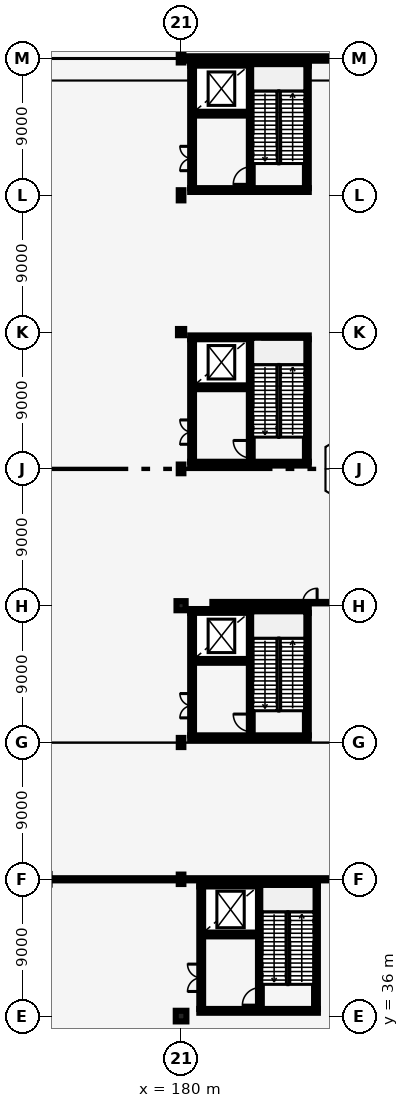
"""IFC4 building model, lengths in metres.
Left out: names, types, materials, properties, quantities, classifications, styles, units other than length and angle.
Written with IfcOpenShell. Run it as: python <this file> out.ifc"""

import sys

from ifc_helpers import new_model, si_unit, direction, frame, frame_2d, origin, origin_2d, place, context, subcontext, project, spatial, rectangle, hollow_circle, i_section, extrude, element, fill, save


model = new_model("IFC4")
c1 = context("Model", 3, precision=1e-05, world=origin(), true_north=direction((0.0, 1.0)))
c2 = subcontext(c1, "Body", "Model", "MODEL_VIEW")
j1 = project(units=[si_unit("LENGTHUNIT", "METRE"), si_unit("PLANEANGLEUNIT", "RADIAN")], contexts=[c1])
p1 = place(None, origin())
s1 = spatial("IfcSite", under=j1, at=p1, CompositionType="ELEMENT")
p2 = place(p1, origin())
s2 = spatial("IfcBuilding", under=s1, at=p2, CompositionType="ELEMENT")
p3 = place(p2, frame((0.0, 0.0, 12.0)))
s3 = spatial("IfcBuildingStorey", under=s2, at=p3, CompositionType="ELEMENT", Elevation=12.0)
p4 = place(p3, frame((180.0, 36.0, 0.0), z_axis=(0.0, 0.0, 1.0), x_axis=(1.0, 0.0, 0.0)))
e1 = element("IfcColumn", 1, at=p4, inside=s3, PredefinedType="COLUMN", context=c2, shape_type="SweptSolid", body=[
    extrude(rectangle(XDim=0.7, YDim=0.7, at=origin_2d()), origin(), (0.0, 0.0, 1.0), 6.0),
])
p5 = place(p3, frame((180.0, 45.0, 0.0), z_axis=(0.0, 0.0, 1.0), x_axis=(1.0, 0.0, 0.0)))
e2 = element("IfcColumn", 2, at=p5, inside=s3, PredefinedType="COLUMN", context=c2, shape_type="SweptSolid", body=[
    extrude(i_section(OverallWidth=0.305, OverallDepth=0.62, WebThickness=0.021, FlangeThickness=0.04, FilletRadius=0.027, at=origin_2d()), origin(), (0.0, 0.0, 1.0), 6.0),
])
p6 = place(p3, frame((180.0, 54.0, 0.0), z_axis=(0.0, 0.0, 1.0), x_axis=(1.0, 0.0, 0.0)))
e3 = element("IfcColumn", 3, at=p6, inside=s3, PredefinedType="COLUMN", context=c2, shape_type="SweptSolid", body=[
    extrude(i_section(OverallWidth=0.3, OverallDepth=0.6, WebThickness=0.015, FlangeThickness=0.03, FilletRadius=0.027, at=origin_2d()), origin(), (0.0, 0.0, 1.0), 6.0),
])
p7 = place(p3, frame((180.0, 63.0, 0.0), z_axis=(0.0, 0.0, 1.0), x_axis=(1.0, 0.0, 0.0)))
e4 = element("IfcColumn", 4, at=p7, inside=s3, PredefinedType="COLUMN", context=c2, shape_type="SweptSolid", body=[
    extrude(rectangle(XDim=0.6, YDim=0.6, at=origin_2d()), origin(), (0.0, 0.0, 1.0), 6.0),
])
p8 = place(p3, frame((180.0, 72.0, 0.0), z_axis=(0.0, 0.0, 1.0), x_axis=(1.0, 0.0, 0.0)))
e5 = element("IfcColumn", 5, at=p8, inside=s3, PredefinedType="COLUMN", context=c2, shape_type="SweptSolid", body=[
    extrude(i_section(OverallWidth=0.306, OverallDepth=0.572, WebThickness=0.021, FlangeThickness=0.04, FilletRadius=0.027, at=origin_2d()), origin(), (0.0, 0.0, 1.0), 6.0),
])
p9 = place(p3, frame((180.0, 81.0, 0.0), z_axis=(0.0, 0.0, 1.0), x_axis=(1.0, 0.0, 0.0)))
e6 = element("IfcColumn", 6, at=p9, inside=s3, PredefinedType="COLUMN", context=c2, shape_type="SweptSolid", body=[
    extrude(hollow_circle(Radius=0.203, WallThickness=0.016, at=origin_2d()), origin(), (0.0, 0.0, 1.0), 6.0),
])
p10 = place(p3, frame((180.0, 90.0, 0.0), z_axis=(0.0, 0.0, 1.0), x_axis=(1.0, 0.0, 0.0)))
e7 = element("IfcColumn", 7, at=p10, inside=s3, PredefinedType="COLUMN", context=c2, shape_type="SweptSolid", body=[
    extrude(i_section(OverallWidth=0.305, OverallDepth=0.668, WebThickness=0.021, FlangeThickness=0.04, FilletRadius=0.027, at=origin_2d()), origin(), (0.0, 0.0, 1.0), 6.0),
])
p11 = place(p3, frame((180.0, 99.0, 0.0), z_axis=(0.0, 0.0, 1.0), x_axis=(1.0, 0.0, 0.0)))
e8 = element("IfcColumn", 8, at=p11, inside=s3, PredefinedType="COLUMN", context=c2, shape_type="SweptSolid", body=[
    extrude(i_section(OverallWidth=0.306, OverallDepth=0.524, WebThickness=0.021, FlangeThickness=0.04, FilletRadius=0.027, at=origin_2d()), origin(), (0.0, 0.0, 1.0), 6.0),
])
p12 = place(p3, frame((180.148, 99.0, 0.0), z_axis=(0.0, 0.0, 1.0), x_axis=(1.0, 0.0, 0.0)))
e9 = element("IfcWall", 9, at=p12, inside=s3, PredefinedType="SOLIDWALL", context=c2, shape_type="SweptSolid", body=[
    extrude(rectangle(XDim=11.557, YDim=0.29, at=frame_2d((5.779, 0.0))), origin(), (0.0, 0.0, 1.0), 4.8),
])
p13 = place(p3, frame((180.725, 54.47, 0.0), z_axis=(0.0, 0.0, 1.0), x_axis=(0.0, 1.0, 0.0)))
e10 = element("IfcWall", 10, at=p13, inside=s3, PredefinedType="SHEAR", context=c2, shape_type="SweptSolid", body=[
    extrude(rectangle(XDim=8.06, YDim=0.25, at=frame_2d((4.03, 0.0))), origin(), (0.0, 0.0, 1.0), 5.64),
])
p14 = place(p13, frame((1.15, 0.0, 0.0)))
e11 = element("IfcOpeningElement", 11, at=p14, cuts=e10, PredefinedType="OPENING", context=c2, shape_type="SweptSolid", body=[
    extrude(rectangle(XDim=1.6, YDim=2.2, at=frame_2d((0.8, 1.1))), frame((0.0, 0.135, 0.0), z_axis=(0.0, -1.0, 0.0), x_axis=(1.0, 0.0, 0.0)), (0.0, 0.0, 1.0), 0.27),
])
p15 = place(p3, frame((188.275, 54.47, 0.0), z_axis=(0.0, 0.0, 1.0), x_axis=(0.0, 1.0, 0.0)))
e12 = element("IfcWall", 12, at=p15, inside=s3, PredefinedType="SHEAR", context=c2, shape_type="SweptSolid", body=[
    extrude(rectangle(XDim=8.06, YDim=0.25, at=frame_2d((4.03, 0.0))), origin(), (0.0, 0.0, 1.0), 5.64),
])
for number, where, z_axis, x_axis in (
    (13, (180.6, 54.345, 0.0), (0.0, 0.0, 1.0), (1.0, 0.0, 0.0)),
    (14, (180.6, 62.655, 0.0), (0.0, 0.0, 1.0), (1.0, 0.0, 0.0)),
):
    element("IfcWall", number, at=place(p3, frame(where, z_axis=z_axis, x_axis=x_axis)), inside=s3, PredefinedType="SHEAR", context=c2, shape_type="SweptSolid", body=[
        extrude(rectangle(XDim=7.8, YDim=0.25, at=frame_2d((3.9, 0.0))), origin(), (0.0, 0.0, 1.0), 5.64),
    ])
p16 = place(p3, frame((184.585, 54.47, 0.0), z_axis=(0.0, 0.0, 1.0), x_axis=(0.0, 1.0, 0.0)))
e15 = element("IfcWall", 15, at=p16, inside=s3, PredefinedType="SHEAR", context=c2, shape_type="SweptSolid", body=[
    extrude(rectangle(XDim=8.06, YDim=0.25, at=frame_2d((4.03, 0.0))), origin(), (0.0, 0.0, 1.0), 5.64),
])
p17 = place(p16, frame((0.25, 0.0, 0.0)))
e16 = element("IfcOpeningElement", 16, at=p17, cuts=e15, PredefinedType="OPENING", context=c2, shape_type="SweptSolid", body=[
    extrude(rectangle(XDim=1.15, YDim=2.15, at=frame_2d((0.575, 1.075))), frame((0.0, 0.135, 0.0), z_axis=(0.0, -1.0, 0.0), x_axis=(1.0, 0.0, 0.0)), (0.0, 0.0, 1.0), 0.27),
])
p18 = place(p3, frame((180.85, 59.37, 0.0), z_axis=(0.0, 0.0, 1.0), x_axis=(1.0, 0.0, 0.0)))
e17 = element("IfcWall", 17, at=p18, inside=s3, PredefinedType="SHEAR", context=c2, shape_type="SweptSolid", body=[
    extrude(rectangle(XDim=3.61, YDim=0.25, at=frame_2d((1.805, 0.0))), origin(), (0.0, 0.0, 1.0), 5.64),
])
p19 = place(p18, frame((0.95, 0.0, 0.0)))
e18 = element("IfcOpeningElement", 18, at=p19, cuts=e17, PredefinedType="OPENING", context=c2, shape_type="SweptSolid", body=[
    extrude(rectangle(XDim=1.2, YDim=2.2, at=frame_2d((0.6, 1.1))), frame((0.0, 0.135, 0.0), z_axis=(0.0, -1.0, 0.0), x_axis=(1.0, 0.0, 0.0)), (0.0, 0.0, 1.0), 0.27),
])
p20 = place(p3, frame((181.325, 36.47, 0.0), z_axis=(0.0, 0.0, 1.0), x_axis=(0.0, 1.0, 0.0)))
e19 = element("IfcWall", 19, at=p20, inside=s3, PredefinedType="SHEAR", context=c2, shape_type="SweptSolid", body=[
    extrude(rectangle(XDim=8.06, YDim=0.25, at=frame_2d((4.03, 0.0))), origin(), (0.0, 0.0, 1.0), 5.61),
])
p21 = place(p20, frame((1.15, 0.0, 0.0)))
e20 = element("IfcOpeningElement", 20, at=p21, cuts=e19, PredefinedType="OPENING", context=c2, shape_type="SweptSolid", body=[
    extrude(rectangle(XDim=1.8, YDim=2.2, at=frame_2d((0.9, 1.1))), frame((0.0, 0.135, 0.0), z_axis=(0.0, -1.0, 0.0), x_axis=(1.0, 0.0, 0.0)), (0.0, 0.0, 1.0), 0.27),
])
p22 = place(p3, frame((188.875, 36.47, 0.0), z_axis=(0.0, 0.0, 1.0), x_axis=(0.0, 1.0, 0.0)))
e21 = element("IfcWall", 21, at=p22, inside=s3, PredefinedType="SHEAR", context=c2, shape_type="SweptSolid", body=[
    extrude(rectangle(XDim=8.06, YDim=0.25, at=frame_2d((4.03, 0.0))), origin(), (0.0, 0.0, 1.0), 5.61),
])
for number, where, z_axis, x_axis in (
    (22, (181.2, 36.345, 0.0), (0.0, 0.0, 1.0), (1.0, 0.0, 0.0)),
    (23, (181.2, 44.655, 0.0), (0.0, 0.0, 1.0), (1.0, 0.0, 0.0)),
):
    element("IfcWall", number, at=place(p3, frame(where, z_axis=z_axis, x_axis=x_axis)), inside=s3, PredefinedType="SHEAR", context=c2, shape_type="SweptSolid", body=[
        extrude(rectangle(XDim=7.8, YDim=0.25, at=frame_2d((3.9, 0.0))), origin(), (0.0, 0.0, 1.0), 5.61),
    ])
p23 = place(p3, frame((185.185, 36.47, 0.0), z_axis=(0.0, 0.0, 1.0), x_axis=(0.0, 1.0, 0.0)))
e24 = element("IfcWall", 24, at=p23, inside=s3, PredefinedType="SHEAR", context=c2, shape_type="SweptSolid", body=[
    extrude(rectangle(XDim=8.06, YDim=0.25, at=frame_2d((4.03, 0.0))), origin(), (0.0, 0.0, 1.0), 5.61),
])
p24 = place(p23, frame((0.25, 0.0, 0.0)))
e25 = element("IfcOpeningElement", 25, at=p24, cuts=e24, PredefinedType="OPENING", context=c2, shape_type="SweptSolid", body=[
    extrude(rectangle(XDim=1.15, YDim=2.15, at=frame_2d((0.575, 1.075))), frame((0.0, 0.135, 0.0), z_axis=(0.0, -1.0, 0.0), x_axis=(1.0, 0.0, 0.0)), (0.0, 0.0, 1.0), 0.27),
])
p25 = place(p3, frame((181.45, 41.37, 0.0), z_axis=(0.0, 0.0, 1.0), x_axis=(1.0, 0.0, 0.0)))
e26 = element("IfcWall", 26, at=p25, inside=s3, PredefinedType="SHEAR", context=c2, shape_type="SweptSolid", body=[
    extrude(rectangle(XDim=3.61, YDim=0.25, at=frame_2d((1.805, 0.0))), origin(), (0.0, 0.0, 1.0), 5.61),
])
p26 = place(p25, frame((0.95, 0.0, 0.0)))
e27 = element("IfcOpeningElement", 27, at=p26, cuts=e26, PredefinedType="OPENING", context=c2, shape_type="SweptSolid", body=[
    extrude(rectangle(XDim=1.2, YDim=2.2, at=frame_2d((0.6, 1.1))), frame((0.0, 0.135, 0.0), z_axis=(0.0, -1.0, 0.0), x_axis=(1.0, 0.0, 0.0)), (0.0, 0.0, 1.0), 0.27),
])
p27 = place(p3, frame((180.725, 72.47, 0.0), z_axis=(0.0, 0.0, 1.0), x_axis=(0.0, 1.0, 0.0)))
e28 = element("IfcWall", 28, at=p27, inside=s3, PredefinedType="SHEAR", context=c2, shape_type="SweptSolid", body=[
    extrude(rectangle(XDim=8.06, YDim=0.25, at=frame_2d((4.03, 0.0))), origin(), (0.0, 0.0, 1.0), 5.64),
])
p28 = place(p27, frame((1.15, 0.0, 0.0)))
e29 = element("IfcOpeningElement", 29, at=p28, cuts=e28, PredefinedType="OPENING", context=c2, shape_type="SweptSolid", body=[
    extrude(rectangle(XDim=1.6, YDim=2.2, at=frame_2d((0.8, 1.1))), frame((0.0, 0.135, 0.0), z_axis=(0.0, -1.0, 0.0), x_axis=(1.0, 0.0, 0.0)), (0.0, 0.0, 1.0), 0.27),
])
p29 = place(p3, frame((188.275, 72.47, 0.0), z_axis=(0.0, 0.0, 1.0), x_axis=(0.0, 1.0, 0.0)))
e30 = element("IfcWall", 30, at=p29, inside=s3, PredefinedType="SHEAR", context=c2, shape_type="SweptSolid", body=[
    extrude(rectangle(XDim=8.06, YDim=0.25, at=frame_2d((4.03, 0.0))), origin(), (0.0, 0.0, 1.0), 5.64),
])
for number, where, z_axis, x_axis in (
    (31, (180.6, 72.345, 0.0), (0.0, 0.0, 1.0), (1.0, 0.0, 0.0)),
    (32, (180.6, 80.655, 0.0), (0.0, 0.0, 1.0), (1.0, 0.0, 0.0)),
):
    element("IfcWall", number, at=place(p3, frame(where, z_axis=z_axis, x_axis=x_axis)), inside=s3, PredefinedType="SHEAR", context=c2, shape_type="SweptSolid", body=[
        extrude(rectangle(XDim=7.8, YDim=0.25, at=frame_2d((3.9, 0.0))), origin(), (0.0, 0.0, 1.0), 5.64),
    ])
p30 = place(p3, frame((184.585, 72.47, 0.0), z_axis=(0.0, 0.0, 1.0), x_axis=(0.0, 1.0, 0.0)))
e33 = element("IfcWall", 33, at=p30, inside=s3, PredefinedType="SHEAR", context=c2, shape_type="SweptSolid", body=[
    extrude(rectangle(XDim=8.06, YDim=0.25, at=frame_2d((4.03, 0.0))), origin(), (0.0, 0.0, 1.0), 5.64),
])
p31 = place(p30, frame((0.25, 0.0, 0.0)))
e34 = element("IfcOpeningElement", 34, at=p31, cuts=e33, PredefinedType="OPENING", context=c2, shape_type="SweptSolid", body=[
    extrude(rectangle(XDim=1.15, YDim=2.15, at=frame_2d((0.575, 1.075))), frame((0.0, 0.135, 0.0), z_axis=(0.0, -1.0, 0.0), x_axis=(1.0, 0.0, 0.0)), (0.0, 0.0, 1.0), 0.27),
])
p32 = place(p3, frame((180.85, 77.37, 0.0), z_axis=(0.0, 0.0, 1.0), x_axis=(1.0, 0.0, 0.0)))
e35 = element("IfcWall", 35, at=p32, inside=s3, PredefinedType="SHEAR", context=c2, shape_type="SweptSolid", body=[
    extrude(rectangle(XDim=3.61, YDim=0.25, at=frame_2d((1.805, 0.0))), origin(), (0.0, 0.0, 1.0), 5.64),
])
p33 = place(p32, frame((0.95, 0.0, 0.0)))
e36 = element("IfcOpeningElement", 36, at=p33, cuts=e35, PredefinedType="OPENING", context=c2, shape_type="SweptSolid", body=[
    extrude(rectangle(XDim=1.2, YDim=2.2, at=frame_2d((0.6, 1.1))), frame((0.0, 0.135, 0.0), z_axis=(0.0, -1.0, 0.0), x_axis=(1.0, 0.0, 0.0)), (0.0, 0.0, 1.0), 0.27),
])
p34 = place(p3, frame((180.725, 90.47, 0.0), z_axis=(0.0, 0.0, 1.0), x_axis=(0.0, 1.0, 0.0)))
e37 = element("IfcWall", 37, at=p34, inside=s3, PredefinedType="SHEAR", context=c2, shape_type="SweptSolid", body=[
    extrude(rectangle(XDim=8.06, YDim=0.25, at=frame_2d((4.03, 0.0))), origin(), (0.0, 0.0, 1.0), 5.64),
])
p35 = place(p34, frame((1.15, 0.0, 0.0)))
e38 = element("IfcOpeningElement", 38, at=p35, cuts=e37, PredefinedType="OPENING", context=c2, shape_type="SweptSolid", body=[
    extrude(rectangle(XDim=1.6, YDim=2.2, at=frame_2d((0.8, 1.1))), frame((0.0, 0.135, 0.0), z_axis=(0.0, -1.0, 0.0), x_axis=(1.0, 0.0, 0.0)), (0.0, 0.0, 1.0), 0.27),
])
p36 = place(p3, frame((188.275, 90.47, 0.0), z_axis=(0.0, 0.0, 1.0), x_axis=(0.0, 1.0, 0.0)))
e39 = element("IfcWall", 39, at=p36, inside=s3, PredefinedType="SHEAR", context=c2, shape_type="SweptSolid", body=[
    extrude(rectangle(XDim=8.06, YDim=0.25, at=frame_2d((4.03, 0.0))), origin(), (0.0, 0.0, 1.0), 5.64),
])
for number, where, z_axis, x_axis in (
    (40, (180.6, 90.345, 0.0), (0.0, 0.0, 1.0), (1.0, 0.0, 0.0)),
    (41, (180.6, 98.655, 0.0), (0.0, 0.0, 1.0), (1.0, 0.0, 0.0)),
):
    element("IfcWall", number, at=place(p3, frame(where, z_axis=z_axis, x_axis=x_axis)), inside=s3, PredefinedType="SHEAR", context=c2, shape_type="SweptSolid", body=[
        extrude(rectangle(XDim=7.8, YDim=0.25, at=frame_2d((3.9, 0.0))), origin(), (0.0, 0.0, 1.0), 5.64),
    ])
p37 = place(p3, frame((184.585, 90.47, 0.0), z_axis=(0.0, 0.0, 1.0), x_axis=(0.0, 1.0, 0.0)))
e42 = element("IfcWall", 42, at=p37, inside=s3, PredefinedType="SHEAR", context=c2, shape_type="SweptSolid", body=[
    extrude(rectangle(XDim=8.06, YDim=0.25, at=frame_2d((4.03, 0.0))), origin(), (0.0, 0.0, 1.0), 5.64),
])
p38 = place(p37, frame((0.25, 0.0, 0.0)))
e43 = element("IfcOpeningElement", 43, at=p38, cuts=e42, PredefinedType="OPENING", context=c2, shape_type="SweptSolid", body=[
    extrude(rectangle(XDim=1.15, YDim=2.15, at=frame_2d((0.575, 1.075))), frame((0.0, 0.135, 0.0), z_axis=(0.0, -1.0, 0.0), x_axis=(1.0, 0.0, 0.0)), (0.0, 0.0, 1.0), 0.27),
])
p39 = place(p3, frame((180.85, 95.37, 0.0), z_axis=(0.0, 0.0, 1.0), x_axis=(1.0, 0.0, 0.0)))
e44 = element("IfcWall", 44, at=p39, inside=s3, PredefinedType="SHEAR", context=c2, shape_type="SweptSolid", body=[
    extrude(rectangle(XDim=3.61, YDim=0.25, at=frame_2d((1.805, 0.0))), origin(), (0.0, 0.0, 1.0), 5.64),
])
p40 = place(p39, frame((0.95, 0.0, 0.0)))
e45 = element("IfcOpeningElement", 45, at=p40, cuts=e44, PredefinedType="OPENING", context=c2, shape_type="SweptSolid", body=[
    extrude(rectangle(XDim=1.2, YDim=2.2, at=frame_2d((0.6, 1.1))), frame((0.0, 0.135, 0.0), z_axis=(0.0, -1.0, 0.0), x_axis=(1.0, 0.0, 0.0)), (0.0, 0.0, 1.0), 0.27),
])
p41 = place(p3, frame((126.6, 45.0, 0.0), z_axis=(0.0, 0.0, 1.0), x_axis=(1.0, 0.0, 0.0)))
e46 = element("IfcWall", 46, at=p41, inside=s3, PredefinedType="PARTITIONING", context=c2, shape_type="SweptSolid", body=[
    extrude(rectangle(XDim=64.8, YDim=0.14, at=frame_2d((32.4, 0.0))), origin(), (0.0, 0.0, 1.0), 4.75),
])
p42 = place(p41, frame((0.55, 0.0, 0.0)))
e47 = element("IfcOpeningElement", 47, at=p42, cuts=e46, PredefinedType="OPENING", context=c2, shape_type="SweptSolid", body=[
    extrude(rectangle(XDim=1.5, YDim=2.25, at=frame_2d((0.75, 1.125))), frame((0.0, 0.08, 0.0), z_axis=(0.0, -1.0, 0.0), x_axis=(1.0, 0.0, 0.0)), (0.0, 0.0, 1.0), 0.16),
])
p43 = place(p3, frame((182.06, 63.2, 0.0), z_axis=(0.0, 0.0, 1.0), x_axis=(1.0, 0.0, 0.0)))
e48 = element("IfcWall", 48, at=p43, inside=s3, PredefinedType="PARTITIONING", context=c2, shape_type="SweptSolid", body=[
    extrude(rectangle(XDim=9.04, YDim=0.095, at=frame_2d((4.52, 0.0))), origin(), (0.0, 0.0, 1.0), 4.75),
])
p44 = place(p43, frame((5.95, 0.0, 0.0)))
e49 = element("IfcOpeningElement", 49, at=p44, cuts=e48, PredefinedType="OPENING", context=c2, shape_type="SweptSolid", body=[
    extrude(rectangle(XDim=0.94, YDim=2.1, at=frame_2d((0.47, 1.05))), frame((0.0, 0.057, 0.0), z_axis=(0.0, -1.0, 0.0), x_axis=(1.0, 0.0, 0.0)), (0.0, 0.0, 1.0), 0.115),
])
p45 = place(p17, origin())
e50 = element("IfcDoor", 50, at=p45, inside=s3, OperationType="SINGLE_SWING_RIGHT", PredefinedType="DOOR", context=c2, shape_type="SweptSolid", body=[
    extrude(rectangle(XDim=1.15, YDim=2.15, at=frame_2d((0.575, 1.075))), frame((0.0, 0.025, 0.0), z_axis=(0.0, -1.0, 0.0), x_axis=(1.0, 0.0, 0.0)), (0.0, 0.0, 1.0), 0.05),
])
fill(e16, e50)
p46 = place(p19, origin())
e51 = element("IfcDoor", 51, at=p46, inside=s3, OperationType="DOUBLE_DOOR_SLIDING", PredefinedType="DOOR", context=c2, shape_type="SweptSolid", body=[
    extrude(rectangle(XDim=1.2, YDim=2.2, at=frame_2d((0.6, 1.1))), frame((0.0, 0.025, 0.0), z_axis=(0.0, -1.0, 0.0), x_axis=(1.0, 0.0, 0.0)), (0.0, 0.0, 1.0), 0.05),
])
fill(e18, e51)
p47 = place(p14, origin())
e52 = element("IfcDoor", 52, at=p47, inside=s3, OperationType="DOUBLE_DOOR_SINGLE_SWING", PredefinedType="DOOR", context=c2, shape_type="SweptSolid", body=[
    extrude(rectangle(XDim=1.6, YDim=2.2, at=frame_2d((0.8, 1.1))), frame((0.0, 0.025, 0.0), z_axis=(0.0, -1.0, 0.0), x_axis=(1.0, 0.0, 0.0)), (0.0, 0.0, 1.0), 0.05),
])
fill(e11, e52)
p48 = place(p24, origin())
e53 = element("IfcDoor", 53, at=p48, inside=s3, OperationType="SINGLE_SWING_LEFT", PredefinedType="DOOR", context=c2, shape_type="SweptSolid", body=[
    extrude(rectangle(XDim=1.15, YDim=2.15, at=frame_2d((0.575, 1.075))), frame((0.0, 0.025, 0.0), z_axis=(0.0, -1.0, 0.0), x_axis=(1.0, 0.0, 0.0)), (0.0, 0.0, 1.0), 0.05),
])
fill(e25, e53)
p49 = place(p26, origin())
e54 = element("IfcDoor", 54, at=p49, inside=s3, OperationType="DOUBLE_DOOR_SLIDING", PredefinedType="DOOR", context=c2, shape_type="SweptSolid", body=[
    extrude(rectangle(XDim=1.2, YDim=2.2, at=frame_2d((0.6, 1.1))), frame((0.0, 0.025, 0.0), z_axis=(0.0, -1.0, 0.0), x_axis=(1.0, 0.0, 0.0)), (0.0, 0.0, 1.0), 0.05),
])
fill(e27, e54)
p50 = place(p21, origin())
e55 = element("IfcDoor", 55, at=p50, inside=s3, OperationType="DOUBLE_DOOR_SINGLE_SWING", PredefinedType="DOOR", context=c2, shape_type="SweptSolid", body=[
    extrude(rectangle(XDim=1.8, YDim=2.2, at=frame_2d((0.9, 1.1))), frame((0.0, 0.025, 0.0), z_axis=(0.0, -1.0, 0.0), x_axis=(1.0, 0.0, 0.0)), (0.0, 0.0, 1.0), 0.05),
])
fill(e20, e55)
p51 = place(p31, origin())
e56 = element("IfcDoor", 56, at=p51, inside=s3, OperationType="SINGLE_SWING_RIGHT", PredefinedType="DOOR", context=c2, shape_type="SweptSolid", body=[
    extrude(rectangle(XDim=1.15, YDim=2.15, at=frame_2d((0.575, 1.075))), frame((0.0, 0.025, 0.0), z_axis=(0.0, -1.0, 0.0), x_axis=(1.0, 0.0, 0.0)), (0.0, 0.0, 1.0), 0.05),
])
fill(e34, e56)
p52 = place(p33, origin())
e57 = element("IfcDoor", 57, at=p52, inside=s3, OperationType="DOUBLE_DOOR_SLIDING", PredefinedType="DOOR", context=c2, shape_type="SweptSolid", body=[
    extrude(rectangle(XDim=1.2, YDim=2.2, at=frame_2d((0.6, 1.1))), frame((0.0, 0.025, 0.0), z_axis=(0.0, -1.0, 0.0), x_axis=(1.0, 0.0, 0.0)), (0.0, 0.0, 1.0), 0.05),
])
fill(e36, e57)
p53 = place(p28, origin())
e58 = element("IfcDoor", 58, at=p53, inside=s3, OperationType="DOUBLE_DOOR_SINGLE_SWING", PredefinedType="DOOR", context=c2, shape_type="SweptSolid", body=[
    extrude(rectangle(XDim=1.6, YDim=2.2, at=frame_2d((0.8, 1.1))), frame((0.0, 0.025, 0.0), z_axis=(0.0, -1.0, 0.0), x_axis=(1.0, 0.0, 0.0)), (0.0, 0.0, 1.0), 0.05),
])
fill(e29, e58)
p54 = place(p38, origin())
e59 = element("IfcDoor", 59, at=p54, inside=s3, OperationType="SINGLE_SWING_LEFT", PredefinedType="DOOR", context=c2, shape_type="SweptSolid", body=[
    extrude(rectangle(XDim=1.15, YDim=2.15, at=frame_2d((0.575, 1.075))), frame((0.0, 0.025, 0.0), z_axis=(0.0, -1.0, 0.0), x_axis=(1.0, 0.0, 0.0)), (0.0, 0.0, 1.0), 0.05),
])
fill(e43, e59)
p55 = place(p40, origin())
e60 = element("IfcDoor", 60, at=p55, inside=s3, OperationType="DOUBLE_DOOR_SLIDING", PredefinedType="DOOR", context=c2, shape_type="SweptSolid", body=[
    extrude(rectangle(XDim=1.2, YDim=2.2, at=frame_2d((0.6, 1.1))), frame((0.0, 0.025, 0.0), z_axis=(0.0, -1.0, 0.0), x_axis=(1.0, 0.0, 0.0)), (0.0, 0.0, 1.0), 0.05),
])
fill(e45, e60)
p56 = place(p35, origin())
e61 = element("IfcDoor", 61, at=p56, inside=s3, OperationType="DOUBLE_DOOR_SINGLE_SWING", PredefinedType="DOOR", context=c2, shape_type="SweptSolid", body=[
    extrude(rectangle(XDim=1.6, YDim=2.2, at=frame_2d((0.8, 1.1))), frame((0.0, 0.025, 0.0), z_axis=(0.0, -1.0, 0.0), x_axis=(1.0, 0.0, 0.0)), (0.0, 0.0, 1.0), 0.05),
])
fill(e38, e61)
p57 = place(p44, origin())
e62 = element("IfcDoor", 62, at=p57, inside=s3, OperationType="SINGLE_SWING_RIGHT", PredefinedType="DOOR", context=c2, shape_type="SweptSolid", body=[
    extrude(rectangle(XDim=0.94, YDim=2.1, at=frame_2d((0.47, 1.05))), frame((0.0, 0.025, 0.0), z_axis=(0.0, -1.0, 0.0), x_axis=(1.0, 0.0, 0.0)), (0.0, 0.0, 1.0), 0.05),
])
fill(e49, e62)
save(model, sys.argv[1])
